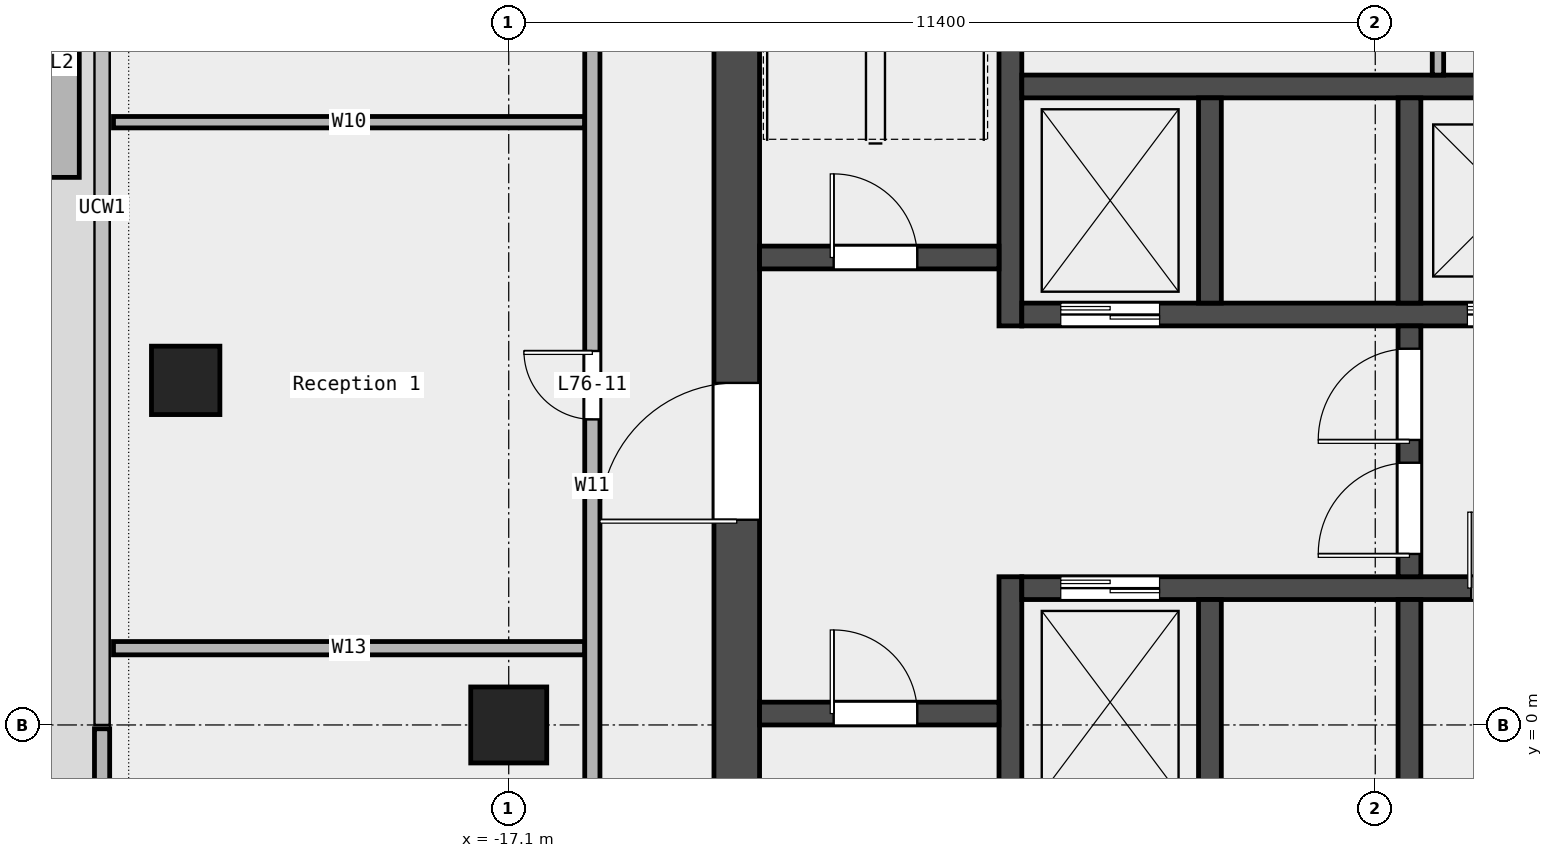
"""IFC4 building model, lengths in metres.
Left out: names, types, materials, properties, quantities, classifications, styles, units other than length and angle.
Written with IfcOpenShell. Run it as: python <this file> out.ifc"""

import sys

from ifc_helpers import new_model, si_unit, direction, frame, frame_2d, origin, origin_2d, place, context, subcontext, project, spatial, rectangle, extrude, element, fill, save


model = new_model("IFC4")
c1 = context("Model", 3, precision=1e-05, world=origin(), true_north=direction((0.0, 1.0)))
c2 = subcontext(c1, "Body", "Model", "MODEL_VIEW")
j1 = project(units=[si_unit("LENGTHUNIT", "METRE"), si_unit("PLANEANGLEUNIT", "RADIAN")], contexts=[c1])
p1 = place(None, origin())
s1 = spatial("IfcSite", under=j1, at=p1, CompositionType="ELEMENT")
p2 = place(p1, origin())
s2 = spatial("IfcBuilding", under=s1, at=p2, CompositionType="ELEMENT")
p3 = place(p2, frame((0.0, 0.0, 349.4)))
s3 = spatial("IfcBuildingStorey", under=s2, at=p3, CompositionType="ELEMENT", Elevation=349.4)
p4 = place(p3, frame((-21.35, 4.533, 0.0), z_axis=(0.0, 0.0, 1.0), x_axis=(1.0, 0.0, 0.0)))
e1 = element("IfcColumn", 1, at=p4, inside=s3, PredefinedType="COLUMN", context=c2, shape_type="SweptSolid", body=[
    extrude(rectangle(XDim=0.9, YDim=0.9, at=origin_2d()), origin(), (0.0, 0.0, 1.0), 3.65),
])
p5 = place(p3, frame((-17.1, 0.0, 0.0), z_axis=(0.0, 0.0, 1.0), x_axis=(1.0, 0.0, 0.0)))
e2 = element("IfcColumn", 2, at=p5, inside=s3, PredefinedType="COLUMN", context=c2, shape_type="SweptSolid", body=[
    extrude(rectangle(XDim=1.0, YDim=1.0, at=origin_2d()), origin(), (0.0, 0.0, 1.0), 3.65),
])
p6 = place(p3, frame((-22.45, -0.05, 0.0), z_axis=(0.0, 0.0, 1.0), x_axis=(0.0, -1.0, 0.0)))
e3 = element("IfcWall", 3, at=p6, inside=s3, PredefinedType="STANDARD", context=c2, shape_type="SweptSolid", body=[
    extrude(rectangle(XDim=4.433, YDim=0.2, at=frame_2d((2.217, 0.0))), origin(), (0.0, 0.0, 1.0), 3.65),
])
p7 = place(p6, frame((1.3, 0.0, 0.0)))
e4 = element("IfcOpeningElement", 4, at=p7, cuts=e3, PredefinedType="OPENING", context=c2, shape_type="SweptSolid", body=[
    extrude(rectangle(XDim=1.8, YDim=2.4, at=frame_2d((0.9, 1.2))), frame((0.0, 0.112, 0.0), z_axis=(0.0, -1.0, 0.0), x_axis=(1.0, 0.0, 0.0)), (0.0, 0.0, 1.0), 0.224),
])
p8 = place(p3, frame((-23.05, 10.204, 0.0), z_axis=(0.0, 0.0, 1.0), x_axis=(0.0, -1.0, 0.0)))
e5 = element("IfcWall", 5, at=p8, inside=s3, PredefinedType="STANDARD", context=c2, shape_type="SweptSolid", body=[
    extrude(rectangle(XDim=3.0, YDim=0.6, at=frame_2d((1.5, 0.0))), origin(), (0.0, 0.0, 1.0), 0.7),
])
p9 = place(p3, frame((-22.3, 1.01, 0.0), z_axis=(0.0, 0.0, 1.0), x_axis=(1.0, 0.0, 0.0)))
e6 = element("IfcWall", 6, at=p9, inside=s3, PredefinedType="PARTITIONING", context=c2, shape_type="SweptSolid", body=[
    extrude(rectangle(XDim=6.2, YDim=0.175, at=frame_2d((3.1, 0.0))), origin(), (0.0, 0.0, 1.0), 3.65),
])
p10 = place(p3, frame((-22.3, 7.93, 0.0), z_axis=(0.0, 0.0, 1.0), x_axis=(1.0, 0.0, 0.0)))
e7 = element("IfcWall", 7, at=p10, inside=s3, PredefinedType="PARTITIONING", context=c2, shape_type="SweptSolid", body=[
    extrude(rectangle(XDim=6.2, YDim=0.15, at=frame_2d((3.1, 0.0))), origin(), (0.0, 0.0, 1.0), 3.65),
])
p11 = place(p3, frame((-16.0, -8.7, 0.0), z_axis=(0.0, 0.0, 1.0), x_axis=(0.0, 1.0, 0.0)))
e8 = element("IfcWall", 8, at=p11, inside=s3, PredefinedType="PARTITIONING", context=c2, shape_type="SweptSolid", body=[
    extrude(rectangle(XDim=23.7, YDim=0.2, at=frame_2d((11.85, 0.0))), origin(), (0.0, 0.0, 1.0), 3.65),
])
p12 = place(p11, frame((4.255, 0.0, 0.0)))
e9 = element("IfcOpeningElement", 9, at=p12, cuts=e8, PredefinedType="OPENING", context=c2, shape_type="SweptSolid", body=[
    extrude(rectangle(XDim=1.2, YDim=2.1, at=frame_2d((0.6, 1.05))), frame((0.0, 0.112, 0.0), z_axis=(0.0, -1.0, 0.0), x_axis=(1.0, 0.0, 0.0)), (0.0, 0.0, 1.0), 0.224),
])
p13 = place(p11, frame((20.265, 0.0, 0.0)))
e10 = element("IfcOpeningElement", 10, at=p13, cuts=e8, PredefinedType="OPENING", context=c2, shape_type="SweptSolid", body=[
    extrude(rectangle(XDim=1.0, YDim=2.1, at=frame_2d((0.5, 1.05))), frame((0.0, 0.112, 0.0), z_axis=(0.0, -1.0, 0.0), x_axis=(1.0, 0.0, 0.0)), (0.0, 0.0, 1.0), 0.224),
])
p14 = place(p11, frame((12.72, 0.0, 0.0)))
e11 = element("IfcOpeningElement", 11, at=p14, cuts=e8, PredefinedType="OPENING", context=c2, shape_type="SweptSolid", body=[
    extrude(rectangle(XDim=0.9, YDim=2.1, at=frame_2d((0.45, 1.05))), frame((0.0, 0.112, 0.0), z_axis=(0.0, -1.0, 0.0), x_axis=(1.0, 0.0, 0.0)), (0.0, 0.0, 1.0), 0.224),
])
p15 = place(p3, frame((-14.1, -6.6, 0.0), z_axis=(0.0, 0.0, 1.0), x_axis=(0.0, 1.0, 0.0)))
e12 = element("IfcWall", 12, at=p15, inside=s3, PredefinedType="SHEAR", context=c2, shape_type="SweptSolid", body=[
    extrude(rectangle(XDim=19.5, YDim=0.6, at=frame_2d((9.75, 0.0))), origin(), (0.0, 0.0, 1.0), 3.7),
])
p16 = place(p15, frame((9.3, 0.0, 0.0)))
e13 = element("IfcOpeningElement", 13, at=p16, cuts=e12, PredefinedType="OPENING", context=c2, shape_type="SweptSolid", body=[
    extrude(rectangle(XDim=1.8, YDim=2.1, at=frame_2d((0.9, 1.05))), frame((0.0, 0.312, 0.0), z_axis=(0.0, -1.0, 0.0), x_axis=(1.0, 0.0, 0.0)), (0.0, 0.0, 1.0), 0.624),
])
p17 = place(p3, frame((-10.5, -6.6, 0.0), z_axis=(0.0, 0.0, 1.0), x_axis=(0.0, 1.0, 0.0)))
e14 = element("IfcWall", 14, at=p17, inside=s3, PredefinedType="SHEAR", context=c2, shape_type="SweptSolid", body=[
    extrude(rectangle(XDim=8.55, YDim=0.3, at=frame_2d((4.275, 0.0))), origin(), (0.0, 0.0, 1.0), 3.7),
])
p18 = place(p3, frame((-10.5, 5.25, 0.0), z_axis=(0.0, 0.0, 1.0), x_axis=(0.0, 1.0, 0.0)))
e15 = element("IfcWall", 15, at=p18, inside=s3, PredefinedType="SHEAR", context=c2, shape_type="SweptSolid", body=[
    extrude(rectangle(XDim=7.65, YDim=0.3, at=frame_2d((3.825, 0.0))), origin(), (0.0, 0.0, 1.0), 3.7),
])
p19 = place(p3, frame((-13.8, 0.15, 0.0), z_axis=(0.0, 0.0, 1.0), x_axis=(1.0, 0.0, 0.0)))
e16 = element("IfcWall", 16, at=p19, inside=s3, PredefinedType="SOLIDWALL", context=c2, shape_type="SweptSolid", body=[
    extrude(rectangle(XDim=3.15, YDim=0.3, at=frame_2d((1.575, 0.0))), origin(), (0.0, 0.0, 1.0), 3.7),
])
p20 = place(p19, frame((0.975, 0.0, 0.0)))
e17 = element("IfcOpeningElement", 17, at=p20, cuts=e16, PredefinedType="OPENING", context=c2, shape_type="SweptSolid", body=[
    extrude(rectangle(XDim=1.1, YDim=2.1, at=frame_2d((0.55, 1.05))), frame((0.0, 0.162, 0.0), z_axis=(0.0, -1.0, 0.0), x_axis=(1.0, 0.0, 0.0)), (0.0, 0.0, 1.0), 0.324),
])
p21 = place(p3, frame((-13.8, 6.15, 0.0), z_axis=(0.0, 0.0, 1.0), x_axis=(1.0, 0.0, 0.0)))
e18 = element("IfcWall", 18, at=p21, inside=s3, PredefinedType="SOLIDWALL", context=c2, shape_type="SweptSolid", body=[
    extrude(rectangle(XDim=3.15, YDim=0.3, at=frame_2d((1.575, 0.0))), origin(), (0.0, 0.0, 1.0), 3.7),
])
p22 = place(p21, frame((0.975, 0.0, 0.0)))
e19 = element("IfcOpeningElement", 19, at=p22, cuts=e18, PredefinedType="OPENING", context=c2, shape_type="SweptSolid", body=[
    extrude(rectangle(XDim=1.1, YDim=2.1, at=frame_2d((0.55, 1.05))), frame((0.0, 0.162, 0.0), z_axis=(0.0, -1.0, 0.0), x_axis=(1.0, 0.0, 0.0)), (0.0, 0.0, 1.0), 0.324),
])
p23 = place(p3, frame((-10.35, 1.8, 0.0), z_axis=(0.0, 0.0, 1.0), x_axis=(1.0, 0.0, 0.0)))
e20 = element("IfcWall", 20, at=p23, inside=s3, PredefinedType="SOLIDWALL", context=c2, shape_type="SweptSolid", body=[
    extrude(rectangle(XDim=20.7, YDim=0.3, at=frame_2d((10.35, 0.0))), origin(), (0.0, 0.0, 1.0), 3.7),
])
p24 = place(p23, frame((0.512, 0.0, 0.0)))
e21 = element("IfcOpeningElement", 21, at=p24, cuts=e20, PredefinedType="OPENING", context=c2, shape_type="SweptSolid", body=[
    extrude(rectangle(XDim=1.3, YDim=2.1, at=frame_2d((0.65, 1.05))), frame((0.0, 0.162, 0.0), z_axis=(0.0, -1.0, 0.0), x_axis=(1.0, 0.0, 0.0)), (0.0, 0.0, 1.0), 0.324),
])
p25 = place(p23, frame((5.913, 0.0, 0.0)))
e22 = element("IfcOpeningElement", 22, at=p25, cuts=e20, PredefinedType="OPENING", context=c2, shape_type="SweptSolid", body=[
    extrude(rectangle(XDim=1.0, YDim=2.1, at=frame_2d((0.5, 1.05))), frame((0.0, 0.162, 0.0), z_axis=(0.0, -1.0, 0.0), x_axis=(1.0, 0.0, 0.0)), (0.0, 0.0, 1.0), 0.324),
])
p26 = place(p23, frame((11.163, 0.0, 0.0)))
e23 = element("IfcOpeningElement", 23, at=p26, cuts=e20, PredefinedType="OPENING", context=c2, shape_type="SweptSolid", body=[
    extrude(rectangle(XDim=1.0, YDim=2.1, at=frame_2d((0.5, 1.05))), frame((0.0, 0.162, 0.0), z_axis=(0.0, -1.0, 0.0), x_axis=(1.0, 0.0, 0.0)), (0.0, 0.0, 1.0), 0.324),
])
p27 = place(p23, frame((17.725, 0.0, 0.0)))
e24 = element("IfcOpeningElement", 24, at=p27, cuts=e20, PredefinedType="OPENING", context=c2, shape_type="SweptSolid", body=[
    extrude(rectangle(XDim=1.0, YDim=2.1, at=frame_2d((0.5, 1.05))), frame((0.0, 0.162, 0.0), z_axis=(0.0, -1.0, 0.0), x_axis=(1.0, 0.0, 0.0)), (0.0, 0.0, 1.0), 0.324),
])
p28 = place(p3, frame((-10.35, 5.4, 0.0), z_axis=(0.0, 0.0, 1.0), x_axis=(1.0, 0.0, 0.0)))
e25 = element("IfcWall", 25, at=p28, inside=s3, PredefinedType="SOLIDWALL", context=c2, shape_type="SweptSolid", body=[
    extrude(rectangle(XDim=20.7, YDim=0.3, at=frame_2d((10.35, 0.0))), origin(), (0.0, 0.0, 1.0), 3.7),
])
p29 = place(p28, frame((0.512, 0.0, 0.0)))
e26 = element("IfcOpeningElement", 26, at=p29, cuts=e25, PredefinedType="OPENING", context=c2, shape_type="SweptSolid", body=[
    extrude(rectangle(XDim=1.3, YDim=2.1, at=frame_2d((0.65, 1.05))), frame((0.0, 0.162, 0.0), z_axis=(0.0, -1.0, 0.0), x_axis=(1.0, 0.0, 0.0)), (0.0, 0.0, 1.0), 0.324),
])
p30 = place(p28, frame((5.863, 0.0, 0.0)))
e27 = element("IfcOpeningElement", 27, at=p30, cuts=e25, PredefinedType="OPENING", context=c2, shape_type="SweptSolid", body=[
    extrude(rectangle(XDim=1.1, YDim=2.1, at=frame_2d((0.55, 1.05))), frame((0.0, 0.162, 0.0), z_axis=(0.0, -1.0, 0.0), x_axis=(1.0, 0.0, 0.0)), (0.0, 0.0, 1.0), 0.324),
])
p31 = place(p28, frame((8.488, 0.0, 0.0)))
e28 = element("IfcOpeningElement", 28, at=p31, cuts=e25, PredefinedType="OPENING", context=c2, shape_type="SweptSolid", body=[
    extrude(rectangle(XDim=1.1, YDim=2.1, at=frame_2d((0.55, 1.05))), frame((0.0, 0.162, 0.0), z_axis=(0.0, -1.0, 0.0), x_axis=(1.0, 0.0, 0.0)), (0.0, 0.0, 1.0), 0.324),
])
p32 = place(p28, frame((11.113, 0.0, 0.0)))
e29 = element("IfcOpeningElement", 29, at=p32, cuts=e25, PredefinedType="OPENING", context=c2, shape_type="SweptSolid", body=[
    extrude(rectangle(XDim=1.1, YDim=2.1, at=frame_2d((0.55, 1.05))), frame((0.0, 0.162, 0.0), z_axis=(0.0, -1.0, 0.0), x_axis=(1.0, 0.0, 0.0)), (0.0, 0.0, 1.0), 0.324),
])
p33 = place(p28, frame((13.738, 0.0, 0.0)))
e30 = element("IfcOpeningElement", 30, at=p33, cuts=e25, PredefinedType="OPENING", context=c2, shape_type="SweptSolid", body=[
    extrude(rectangle(XDim=1.1, YDim=2.1, at=frame_2d((0.55, 1.05))), frame((0.0, 0.162, 0.0), z_axis=(0.0, -1.0, 0.0), x_axis=(1.0, 0.0, 0.0)), (0.0, 0.0, 1.0), 0.324),
])
p34 = place(p28, frame((16.363, 0.0, 0.0)))
e31 = element("IfcOpeningElement", 31, at=p34, cuts=e25, PredefinedType="OPENING", context=c2, shape_type="SweptSolid", body=[
    extrude(rectangle(XDim=1.1, YDim=2.1, at=frame_2d((0.55, 1.05))), frame((0.0, 0.162, 0.0), z_axis=(0.0, -1.0, 0.0), x_axis=(1.0, 0.0, 0.0)), (0.0, 0.0, 1.0), 0.324),
])
p35 = place(p28, frame((18.988, 0.0, 0.0)))
e32 = element("IfcOpeningElement", 32, at=p35, cuts=e25, PredefinedType="OPENING", context=c2, shape_type="SweptSolid", body=[
    extrude(rectangle(XDim=1.1, YDim=2.1, at=frame_2d((0.55, 1.05))), frame((0.0, 0.162, 0.0), z_axis=(0.0, -1.0, 0.0), x_axis=(1.0, 0.0, 0.0)), (0.0, 0.0, 1.0), 0.324),
])
p36 = place(p3, frame((-10.35, 8.4, 0.0), z_axis=(0.0, 0.0, 1.0), x_axis=(1.0, 0.0, 0.0)))
e33 = element("IfcWall", 33, at=p36, inside=s3, PredefinedType="SOLIDWALL", context=c2, shape_type="SweptSolid", body=[
    extrude(rectangle(XDim=20.7, YDim=0.3, at=frame_2d((10.35, 0.0))), origin(), (0.0, 0.0, 1.0), 3.7),
])
for number, where, z_axis, x_axis in (
    (34, (-7.875, -1.05, 0.0), (0.0, 0.0, 1.0), (0.0, 1.0, 0.0)),
    (35, (-5.25, -1.05, 0.0), (0.0, 0.0, 1.0), (0.0, 1.0, 0.0)),
    (36, (-7.875, 5.55, 0.0), (0.0, 0.0, 1.0), (0.0, 1.0, 0.0)),
    (37, (-5.25, 5.55, 0.0), (0.0, 0.0, 1.0), (0.0, 1.0, 0.0)),
):
    element("IfcWall", number, at=place(p3, frame(where, z_axis=z_axis, x_axis=x_axis)), inside=s3, PredefinedType="SOLIDWALL", context=c2, shape_type="SweptSolid", body=[
        extrude(rectangle(XDim=2.7, YDim=0.3, at=frame_2d((1.35, 0.0))), origin(), (0.0, 0.0, 1.0), 3.7),
    ])
p37 = place(p3, frame((-5.25, 1.95, 0.0), z_axis=(0.0, 0.0, 1.0), x_axis=(0.0, 1.0, 0.0)))
e38 = element("IfcWall", 38, at=p37, inside=s3, PredefinedType="SOLIDWALL", context=c2, shape_type="SweptSolid", body=[
    extrude(rectangle(XDim=3.3, YDim=0.3, at=frame_2d((1.65, 0.0))), origin(), (0.0, 0.0, 1.0), 3.7),
])
p38 = place(p37, frame((0.3, 0.0, 0.0)))
e39 = element("IfcOpeningElement", 39, at=p38, cuts=e38, PredefinedType="OPENING", context=c2, shape_type="SweptSolid", body=[
    extrude(rectangle(XDim=1.2, YDim=2.1, at=frame_2d((0.6, 1.05))), frame((0.0, 0.162, 0.0), z_axis=(0.0, -1.0, 0.0), x_axis=(1.0, 0.0, 0.0)), (0.0, 0.0, 1.0), 0.324),
])
p39 = place(p37, frame((1.8, 0.0, 0.0)))
e40 = element("IfcOpeningElement", 40, at=p39, cuts=e38, PredefinedType="OPENING", context=c2, shape_type="SweptSolid", body=[
    extrude(rectangle(XDim=1.2, YDim=2.1, at=frame_2d((0.6, 1.05))), frame((0.0, 0.162, 0.0), z_axis=(0.0, -1.0, 0.0), x_axis=(1.0, 0.0, 0.0)), (0.0, 0.0, 1.0), 0.324),
])
p40 = place(p3, frame((-4.875, 8.55, 0.0), z_axis=(0.0, 0.0, 1.0), x_axis=(0.0, 1.0, 0.0)))
e41 = element("IfcWall", 41, at=p40, inside=s3, PredefinedType="PARTITIONING", context=c2, shape_type="SweptSolid", body=[
    extrude(rectangle(XDim=2.775, YDim=0.15, at=frame_2d((1.387, 0.0))), origin(), (0.0, 0.0, 1.0), 3.7),
])
p41 = place(p14, origin())
e42 = element("IfcDoor", 42, at=p41, inside=s3, OperationType="SINGLE_SWING_RIGHT", PredefinedType="DOOR", context=c2, shape_type="SweptSolid", body=[
    extrude(rectangle(XDim=0.9, YDim=2.1, at=frame_2d((0.45, 1.05))), frame((0.0, 0.025, 0.0), z_axis=(0.0, -1.0, 0.0), x_axis=(1.0, 0.0, 0.0)), (0.0, 0.0, 1.0), 0.05),
])
fill(e11, e42)
p42 = place(p20, origin())
e43 = element("IfcDoor", 43, at=p42, inside=s3, OperationType="SINGLE_SWING_LEFT", PredefinedType="DOOR", context=c2, shape_type="SweptSolid", body=[
    extrude(rectangle(XDim=1.1, YDim=2.1, at=frame_2d((0.55, 1.05))), frame((0.0, 0.025, 0.0), z_axis=(0.0, -1.0, 0.0), x_axis=(1.0, 0.0, 0.0)), (0.0, 0.0, 1.0), 0.05),
])
fill(e17, e43)
p43 = place(p22, origin())
e44 = element("IfcDoor", 44, at=p43, inside=s3, OperationType="SINGLE_SWING_LEFT", PredefinedType="DOOR", context=c2, shape_type="SweptSolid", body=[
    extrude(rectangle(XDim=1.1, YDim=2.1, at=frame_2d((0.55, 1.05))), frame((0.0, 0.025, 0.0), z_axis=(0.0, -1.0, 0.0), x_axis=(1.0, 0.0, 0.0)), (0.0, 0.0, 1.0), 0.05),
])
fill(e19, e44)
p44 = place(p16, origin())
e45 = element("IfcDoor", 45, at=p44, inside=s3, OperationType="DOUBLE_DOOR_SINGLE_SWING", PredefinedType="DOOR", context=c2, shape_type="SweptSolid", body=[
    extrude(rectangle(XDim=1.8, YDim=2.1, at=frame_2d((0.9, 1.05))), frame((0.0, 0.025, 0.0), z_axis=(0.0, -1.0, 0.0), x_axis=(1.0, 0.0, 0.0)), (0.0, 0.0, 1.0), 0.05),
])
fill(e13, e45)
p45 = place(p38, origin())
e46 = element("IfcDoor", 46, at=p45, inside=s3, OperationType="SINGLE_SWING_LEFT", PredefinedType="DOOR", context=c2, shape_type="SweptSolid", body=[
    extrude(rectangle(XDim=1.2, YDim=2.1, at=frame_2d((0.6, 1.05))), frame((0.0, 0.025, 0.0), z_axis=(0.0, -1.0, 0.0), x_axis=(1.0, 0.0, 0.0)), (0.0, 0.0, 1.0), 0.05),
])
fill(e39, e46)
p46 = place(p39, origin())
e47 = element("IfcDoor", 47, at=p46, inside=s3, OperationType="SINGLE_SWING_RIGHT", PredefinedType="DOOR", context=c2, shape_type="SweptSolid", body=[
    extrude(rectangle(XDim=1.2, YDim=2.1, at=frame_2d((0.6, 1.05))), frame((0.0, 0.025, 0.0), z_axis=(0.0, -1.0, 0.0), x_axis=(1.0, 0.0, 0.0)), (0.0, 0.0, 1.0), 0.05),
])
fill(e40, e47)
p47 = place(p24, origin())
e48 = element("IfcDoor", 48, at=p47, inside=s3, OperationType="DOUBLE_DOOR_SLIDING", PredefinedType="DOOR", context=c2, shape_type="SweptSolid", body=[
    extrude(rectangle(XDim=1.3, YDim=2.1, at=frame_2d((0.65, 1.05))), frame((0.0, 0.025, 0.0), z_axis=(0.0, -1.0, 0.0), x_axis=(1.0, 0.0, 0.0)), (0.0, 0.0, 1.0), 0.05),
])
fill(e21, e48)
p48 = place(p29, origin())
e49 = element("IfcDoor", 49, at=p48, inside=s3, OperationType="DOUBLE_DOOR_SLIDING", PredefinedType="DOOR", context=c2, shape_type="SweptSolid", body=[
    extrude(rectangle(XDim=1.3, YDim=2.1, at=frame_2d((0.65, 1.05))), frame((0.0, 0.025, 0.0), z_axis=(0.0, -1.0, 0.0), x_axis=(1.0, 0.0, 0.0)), (0.0, 0.0, 1.0), 0.05),
])
fill(e26, e49)
p49 = place(p30, origin())
e50 = element("IfcDoor", 50, at=p49, inside=s3, OperationType="DOUBLE_DOOR_SLIDING", PredefinedType="DOOR", context=c2, shape_type="SweptSolid", body=[
    extrude(rectangle(XDim=1.1, YDim=2.1, at=frame_2d((0.55, 1.05))), frame((0.0, 0.025, 0.0), z_axis=(0.0, -1.0, 0.0), x_axis=(1.0, 0.0, 0.0)), (0.0, 0.0, 1.0), 0.05),
])
fill(e27, e50)
p50 = place(p25, origin())
e51 = element("IfcDoor", 51, at=p50, inside=s3, OperationType="SINGLE_SWING_LEFT", PredefinedType="DOOR", context=c2, shape_type="SweptSolid", body=[
    extrude(rectangle(XDim=1.0, YDim=2.1, at=frame_2d((0.5, 1.05))), frame((0.0, 0.025, 0.0), z_axis=(0.0, -1.0, 0.0), x_axis=(1.0, 0.0, 0.0)), (0.0, 0.0, 1.0), 0.05),
])
fill(e22, e51)
save(model, sys.argv[1])
